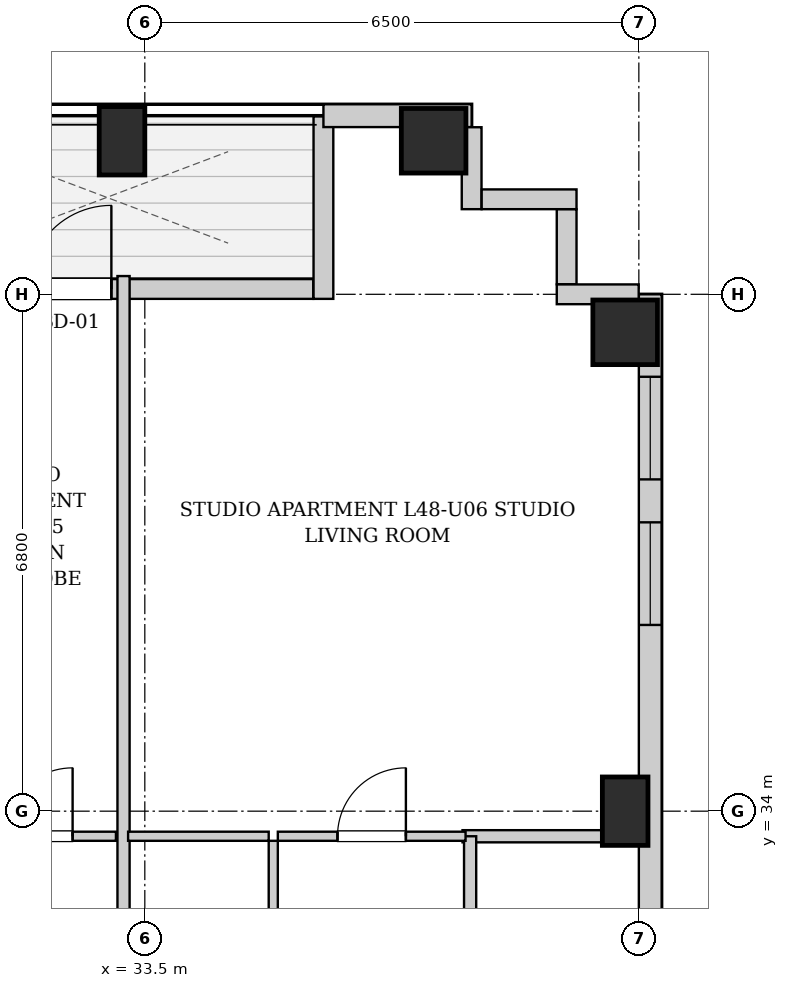
"""IFC4 building model, lengths in metres.
Left out: names, types, materials, properties, quantities, classifications, styles, units other than length and angle.
Written with IfcOpenShell. Run it as: python <this file> out.ifc"""

import sys

from ifc_helpers import new_model, si_unit, direction, frame, frame_2d, origin, origin_2d, place, context, subcontext, project, spatial, rectangle, extrude, element, fill, save


model = new_model("IFC4")
c1 = context("Model", 3, precision=1e-05, world=origin(), true_north=direction((0.0, 1.0)))
c2 = subcontext(c1, "Body", "Model", "MODEL_VIEW")
j1 = project(units=[si_unit("LENGTHUNIT", "METRE"), si_unit("PLANEANGLEUNIT", "RADIAN")], contexts=[c1])
p1 = place(None, origin())
s1 = spatial("IfcSite", under=j1, at=p1, CompositionType="ELEMENT")
p2 = place(p1, origin())
s2 = spatial("IfcBuilding", under=s1, at=p2, CompositionType="ELEMENT")
p3 = place(p2, frame((0.0, 0.0, 166.65)))
s3 = spatial("IfcBuildingStorey", under=s2, at=p3, CompositionType="ELEMENT", Elevation=166.65)
p4 = place(p3, frame((33.2, 42.82, 0.0), z_axis=(0.0, 0.0, 1.0), x_axis=(1.0, 0.0, 0.0)))
e1 = element("IfcColumn", 1, at=p4, inside=s3, PredefinedType="COLUMN", context=c2, shape_type="SweptSolid", body=[
    extrude(rectangle(XDim=0.6, YDim=0.9, at=origin_2d()), origin(), (0.0, 0.0, 1.0), 3.25),
])
p5 = place(p3, frame((37.3, 42.82, 0.0), z_axis=(0.0, 0.0, 1.0), x_axis=(1.0, 0.0, 0.0)))
e2 = element("IfcColumn", 2, at=p5, inside=s3, PredefinedType="COLUMN", context=c2, shape_type="SweptSolid", body=[
    extrude(rectangle(XDim=0.85, YDim=0.85, at=origin_2d()), origin(), (0.0, 0.0, 1.0), 3.25),
])
p6 = place(p3, frame((39.82, 34.0, 0.0), z_axis=(0.0, 0.0, 1.0), x_axis=(1.0, 0.0, 0.0)))
e3 = element("IfcColumn", 3, at=p6, inside=s3, PredefinedType="COLUMN", context=c2, shape_type="SweptSolid", body=[
    extrude(rectangle(XDim=0.6, YDim=0.9, at=origin_2d()), origin(), (0.0, 0.0, 1.0), 3.25),
])
p7 = place(p3, frame((39.82, 40.3, 0.0), z_axis=(0.0, 0.0, 1.0), x_axis=(1.0, 0.0, 0.0)))
e4 = element("IfcColumn", 4, at=p7, inside=s3, PredefinedType="COLUMN", context=c2, shape_type="SweptSolid", body=[
    extrude(rectangle(XDim=0.85, YDim=0.85, at=origin_2d()), origin(), (0.0, 0.0, 1.0), 3.25),
])
p8 = place(p3, frame((30.284, 40.87, 0.0), z_axis=(0.0, 0.0, 1.0), x_axis=(1.0, 0.0, 0.0)))
e5 = element("IfcWall", 5, at=p8, inside=s3, PredefinedType="SOLIDWALL", context=c2, shape_type="SweptSolid", body=[
    extrude(rectangle(XDim=5.432, YDim=0.26, at=frame_2d((2.716, 0.0))), origin(), (0.0, 0.0, 1.0), 2.93),
])
p9 = place(p8, frame((1.676, 0.0, 0.0)))
e6 = element("IfcOpeningElement", 6, at=p9, cuts=e5, PredefinedType="OPENING", context=c2, shape_type="SweptSolid", body=[
    extrude(rectangle(XDim=1.1, YDim=2.0, at=frame_2d((0.55, 1.0))), frame((0.0, 0.14, 0.0), z_axis=(0.0, -1.0, 0.0), x_axis=(1.0, 0.0, 0.0)), (0.0, 0.0, 1.0), 0.28),
])
p10 = place(p8, frame((0.666, 0.0, 0.55)))
e7 = element("IfcOpeningElement", 7, at=p10, cuts=e5, PredefinedType="OPENING", context=c2, shape_type="SweptSolid", body=[
    extrude(rectangle(XDim=0.85, YDim=1.2, at=frame_2d((0.425, 0.6))), frame((0.0, 0.14, 0.0), z_axis=(0.0, -1.0, 0.0), x_axis=(1.0, 0.0, 0.0)), (0.0, 0.0, 1.0), 0.28),
])
p11 = place(p3, frame((35.85, 40.74, 0.0), z_axis=(0.0, 0.0, 1.0), x_axis=(0.0, 1.0, 0.0)))
e8 = element("IfcWall", 8, at=p11, inside=s3, PredefinedType="SOLIDWALL", context=c2, shape_type="SweptSolid", body=[
    extrude(rectangle(XDim=2.4, YDim=0.26, at=frame_2d((1.2, 0.0))), origin(), (0.0, 0.0, 1.0), 2.93),
])
p12 = place(p3, frame((35.85, 43.15, 0.0), z_axis=(0.0, 0.0, 1.0), x_axis=(1.0, 0.0, 0.0)))
e9 = element("IfcWall", 9, at=p12, inside=s3, PredefinedType="SOLIDWALL", context=c2, shape_type="SweptSolid", body=[
    extrude(rectangle(XDim=1.95, YDim=0.3, at=frame_2d((0.975, 0.0))), origin(), (0.0, 0.0, 1.0), 2.93),
])
p13 = place(p3, frame((40.15, 40.8, 0.0), z_axis=(0.0, 0.0, 1.0), x_axis=(0.0, -1.0, 0.0)))
e10 = element("IfcWall", 10, at=p13, inside=s3, PredefinedType="SOLIDWALL", context=c2, shape_type="SweptSolid", body=[
    extrude(rectangle(XDim=34.5, YDim=0.3, at=frame_2d((17.25, 0.0))), origin(), (0.0, 0.0, 1.0), 2.93),
])
p14 = place(p13, frame((31.725, 0.0, 0.55)))
e11 = element("IfcOpeningElement", 11, at=p14, cuts=e10, PredefinedType="OPENING", context=c2, shape_type="SweptSolid", body=[
    extrude(rectangle(XDim=1.35, YDim=1.2, at=frame_2d((0.675, 0.6))), frame((0.0, 0.16, 0.0), z_axis=(0.0, -1.0, 0.0), x_axis=(1.0, 0.0, 0.0)), (0.0, 0.0, 1.0), 0.32),
])
p15 = place(p13, frame((3.0, 0.0, 0.55)))
e12 = element("IfcOpeningElement", 12, at=p15, cuts=e10, PredefinedType="OPENING", context=c2, shape_type="SweptSolid", body=[
    extrude(rectangle(XDim=1.35, YDim=1.2, at=frame_2d((0.675, 0.6))), frame((0.0, 0.16, 0.0), z_axis=(0.0, -1.0, 0.0), x_axis=(1.0, 0.0, 0.0)), (0.0, 0.0, 1.0), 0.32),
])
p16 = place(p13, frame((1.085, 0.0, 0.55)))
e13 = element("IfcOpeningElement", 13, at=p16, cuts=e10, PredefinedType="OPENING", context=c2, shape_type="SweptSolid", body=[
    extrude(rectangle(XDim=1.35, YDim=1.2, at=frame_2d((0.675, 0.6))), frame((0.0, 0.16, 0.0), z_axis=(0.0, -1.0, 0.0), x_axis=(1.0, 0.0, 0.0)), (0.0, 0.0, 1.0), 0.32),
])
p17 = place(p13, frame((21.3, 0.0, 0.55)))
e14 = element("IfcOpeningElement", 14, at=p17, cuts=e10, PredefinedType="OPENING", context=c2, shape_type="SweptSolid", body=[
    extrude(rectangle(XDim=1.35, YDim=1.2, at=frame_2d((0.675, 0.6))), frame((0.0, 0.16, 0.0), z_axis=(0.0, -1.0, 0.0), x_axis=(1.0, 0.0, 0.0)), (0.0, 0.0, 1.0), 0.32),
])
p18 = place(p13, frame((22.91, 0.0, 0.55)))
e15 = element("IfcOpeningElement", 15, at=p18, cuts=e10, PredefinedType="OPENING", context=c2, shape_type="SweptSolid", body=[
    extrude(rectangle(XDim=1.35, YDim=1.2, at=frame_2d((0.675, 0.6))), frame((0.0, 0.16, 0.0), z_axis=(0.0, -1.0, 0.0), x_axis=(1.0, 0.0, 0.0)), (0.0, 0.0, 1.0), 0.32),
])
p19 = place(p13, frame((14.175, 0.0, 0.55)))
e16 = element("IfcOpeningElement", 16, at=p19, cuts=e10, PredefinedType="OPENING", context=c2, shape_type="SweptSolid", body=[
    extrude(rectangle(XDim=1.35, YDim=1.2, at=frame_2d((0.675, 0.6))), frame((0.0, 0.16, 0.0), z_axis=(0.0, -1.0, 0.0), x_axis=(1.0, 0.0, 0.0)), (0.0, 0.0, 1.0), 0.32),
])
p20 = place(p13, frame((12.41, 0.0, 0.55)))
e17 = element("IfcOpeningElement", 17, at=p20, cuts=e10, PredefinedType="OPENING", context=c2, shape_type="SweptSolid", body=[
    extrude(rectangle(XDim=1.35, YDim=1.2, at=frame_2d((0.675, 0.6))), frame((0.0, 0.16, 0.0), z_axis=(0.0, -1.0, 0.0), x_axis=(1.0, 0.0, 0.0)), (0.0, 0.0, 1.0), 0.32),
])
p21 = place(p3, frame((37.8, 42.998, 0.0), z_axis=(0.0, 0.0, 1.0), x_axis=(0.0, -1.0, 0.0)))
e18 = element("IfcWall", 18, at=p21, inside=s3, PredefinedType="SOLIDWALL", context=c2, shape_type="SweptSolid", body=[
    extrude(rectangle(XDim=1.078, YDim=0.26, at=frame_2d((0.539, 0.0))), origin(), (0.0, 0.0, 1.0), 2.93),
])
p22 = place(p3, frame((37.932, 42.05, 0.0), z_axis=(0.0, 0.0, 1.0), x_axis=(1.0, 0.0, 0.0)))
e19 = element("IfcWall", 19, at=p22, inside=s3, PredefinedType="SOLIDWALL", context=c2, shape_type="SweptSolid", body=[
    extrude(rectangle(XDim=1.248, YDim=0.26, at=frame_2d((0.624, 0.0))), origin(), (0.0, 0.0, 1.0), 2.93),
])
p23 = place(p3, frame((39.05, 41.918, 0.0), z_axis=(0.0, 0.0, 1.0), x_axis=(0.0, -1.0, 0.0)))
e20 = element("IfcWall", 20, at=p23, inside=s3, PredefinedType="SOLIDWALL", context=c2, shape_type="SweptSolid", body=[
    extrude(rectangle(XDim=0.986, YDim=0.26, at=frame_2d((0.493, 0.0))), origin(), (0.0, 0.0, 1.0), 2.93),
])
p24 = place(p3, frame((38.92, 40.8, 0.0), z_axis=(0.0, 0.0, 1.0), x_axis=(1.0, 0.0, 0.0)))
e21 = element("IfcWall", 21, at=p24, inside=s3, PredefinedType="SOLIDWALL", context=c2, shape_type="SweptSolid", body=[
    extrude(rectangle(XDim=1.078, YDim=0.26, at=frame_2d((0.539, 0.0))), origin(), (0.0, 0.0, 1.0), 2.93),
])
p25 = place(p3, frame((31.081, 33.67, 0.0), z_axis=(0.0, 0.0, 1.0), x_axis=(1.0, 0.0, 0.0)))
e22 = element("IfcWall", 22, at=p25, inside=s3, PredefinedType="PARTITIONING", context=c2, shape_type="SweptSolid", body=[
    extrude(rectangle(XDim=2.039, YDim=0.12, at=frame_2d((1.02, 0.0))), origin(), (0.0, 0.0, 1.0), 2.93),
])
p26 = place(p25, frame((0.569, 0.0, 0.0)))
e23 = element("IfcOpeningElement", 23, at=p26, cuts=e22, PredefinedType="OPENING", context=c2, shape_type="SweptSolid", body=[
    extrude(rectangle(XDim=0.9, YDim=2.05, at=frame_2d((0.45, 1.025))), frame((0.0, 0.07, 0.0), z_axis=(0.0, -1.0, 0.0), x_axis=(1.0, 0.0, 0.0)), (0.0, 0.0, 1.0), 0.14),
])
p27 = place(p3, frame((37.68, 33.67, 0.0), z_axis=(0.0, 0.0, 1.0), x_axis=(1.0, 0.0, 0.0)))
e24 = element("IfcWall", 24, at=p27, inside=s3, PredefinedType="PARTITIONING", context=c2, shape_type="SweptSolid", body=[
    extrude(rectangle(XDim=2.34, YDim=0.16, at=frame_2d((1.17, 0.0))), origin(), (0.0, 0.0, 1.0), 2.93),
])
p28 = place(p3, frame((37.78, 30.76, 0.0), z_axis=(0.0, 0.0, 1.0), x_axis=(0.0, 1.0, 0.0)))
e25 = element("IfcWall", 25, at=p28, inside=s3, PredefinedType="PARTITIONING", context=c2, shape_type="SweptSolid", body=[
    extrude(rectangle(XDim=2.91, YDim=0.16, at=frame_2d((1.455, 0.0))), origin(), (0.0, 0.0, 1.0), 2.93),
])
p29 = place(p3, frame((33.22, 30.76, 0.0), z_axis=(0.0, 0.0, 1.0), x_axis=(0.0, 1.0, 0.0)))
e26 = element("IfcWall", 26, at=p29, inside=s3, PredefinedType="PARTITIONING", context=c2, shape_type="SweptSolid", body=[
    extrude(rectangle(XDim=10.28, YDim=0.16, at=frame_2d((5.14, 0.0))), origin(), (0.0, 0.0, 1.0), 2.382),
])
p30 = place(p3, frame((35.19, 30.76, 0.0), z_axis=(0.0, 0.0, 1.0), x_axis=(0.0, 1.0, 0.0)))
e27 = element("IfcWall", 27, at=p30, inside=s3, PredefinedType="PARTITIONING", context=c2, shape_type="SweptSolid", body=[
    extrude(rectangle(XDim=2.85, YDim=0.12, at=frame_2d((1.425, 0.0))), origin(), (0.0, 0.0, 1.0), 2.93),
])
p31 = place(p30, frame((0.995, 0.0, 0.0)))
e28 = element("IfcOpeningElement", 28, at=p31, cuts=e27, PredefinedType="OPENING", context=c2, shape_type="SweptSolid", body=[
    extrude(rectangle(XDim=0.86, YDim=2.05, at=frame_2d((0.43, 1.025))), frame((0.0, 0.07, 0.0), z_axis=(0.0, -1.0, 0.0), x_axis=(1.0, 0.0, 0.0)), (0.0, 0.0, 1.0), 0.14),
])
p32 = place(p3, frame((33.28, 33.67, 0.0), z_axis=(0.0, 0.0, 1.0), x_axis=(1.0, 0.0, 0.0)))
e29 = element("IfcWall", 29, at=p32, inside=s3, PredefinedType="PARTITIONING", context=c2, shape_type="SweptSolid", body=[
    extrude(rectangle(XDim=1.85, YDim=0.12, at=frame_2d((0.925, 0.0))), origin(), (0.0, 0.0, 1.0), 2.93),
])
p33 = place(p3, frame((35.25, 33.67, 0.0), z_axis=(0.0, 0.0, 1.0), x_axis=(1.0, 0.0, 0.0)))
e30 = element("IfcWall", 30, at=p33, inside=s3, PredefinedType="PARTITIONING", context=c2, shape_type="SweptSolid", body=[
    extrude(rectangle(XDim=2.47, YDim=0.12, at=frame_2d((1.235, 0.0))), origin(), (0.0, 0.0, 1.0), 2.93),
])
p34 = place(p33, frame((0.785, 0.0, 0.0)))
e31 = element("IfcOpeningElement", 31, at=p34, cuts=e30, PredefinedType="OPENING", context=c2, shape_type="SweptSolid", body=[
    extrude(rectangle(XDim=0.9, YDim=2.05, at=frame_2d((0.45, 1.025))), frame((0.0, 0.07, 0.0), z_axis=(0.0, -1.0, 0.0), x_axis=(1.0, 0.0, 0.0)), (0.0, 0.0, 1.0), 0.14),
])
p35 = place(p26, origin())
e32 = element("IfcDoor", 32, at=p35, inside=s3, OperationType="SINGLE_SWING_RIGHT", PredefinedType="DOOR", context=c2, shape_type="SweptSolid", body=[
    extrude(rectangle(XDim=0.9, YDim=2.05, at=frame_2d((0.45, 1.025))), frame((0.0, 0.025, 0.0), z_axis=(0.0, -1.0, 0.0), x_axis=(1.0, 0.0, 0.0)), (0.0, 0.0, 1.0), 0.05),
])
fill(e23, e32)
p36 = place(p34, origin())
e33 = element("IfcDoor", 33, at=p36, inside=s3, OperationType="SINGLE_SWING_RIGHT", PredefinedType="DOOR", context=c2, shape_type="SweptSolid", body=[
    extrude(rectangle(XDim=0.9, YDim=2.05, at=frame_2d((0.45, 1.025))), frame((0.0, 0.025, 0.0), z_axis=(0.0, -1.0, 0.0), x_axis=(1.0, 0.0, 0.0)), (0.0, 0.0, 1.0), 0.05),
])
fill(e31, e33)
p37 = place(p9, origin())
e34 = element("IfcDoor", 34, at=p37, inside=s3, OperationType="SINGLE_SWING_RIGHT", PredefinedType="DOOR", context=c2, shape_type="SweptSolid", body=[
    extrude(rectangle(XDim=1.1, YDim=2.0, at=frame_2d((0.55, 1.0))), frame((0.0, 0.025, 0.0), z_axis=(0.0, -1.0, 0.0), x_axis=(1.0, 0.0, 0.0)), (0.0, 0.0, 1.0), 0.05),
])
fill(e6, e34)
p38 = place(p15, origin())
e35 = element("IfcWindow", 35, at=p38, inside=s3, PartitioningType="SINGLE_PANEL", PredefinedType="WINDOW", context=c2, shape_type="SweptSolid", body=[
    extrude(rectangle(XDim=1.35, YDim=1.2, at=frame_2d((0.675, 0.6))), frame((0.0, 0.03, 0.0), z_axis=(0.0, -1.0, 0.0), x_axis=(1.0, 0.0, 0.0)), (0.0, 0.0, 1.0), 0.06),
])
fill(e12, e35)
p39 = place(p16, origin())
e36 = element("IfcWindow", 36, at=p39, inside=s3, PartitioningType="SINGLE_PANEL", PredefinedType="WINDOW", context=c2, shape_type="SweptSolid", body=[
    extrude(rectangle(XDim=1.35, YDim=1.2, at=frame_2d((0.675, 0.6))), frame((0.0, 0.03, 0.0), z_axis=(0.0, -1.0, 0.0), x_axis=(1.0, 0.0, 0.0)), (0.0, 0.0, 1.0), 0.06),
])
fill(e13, e36)
save(model, sys.argv[1])
